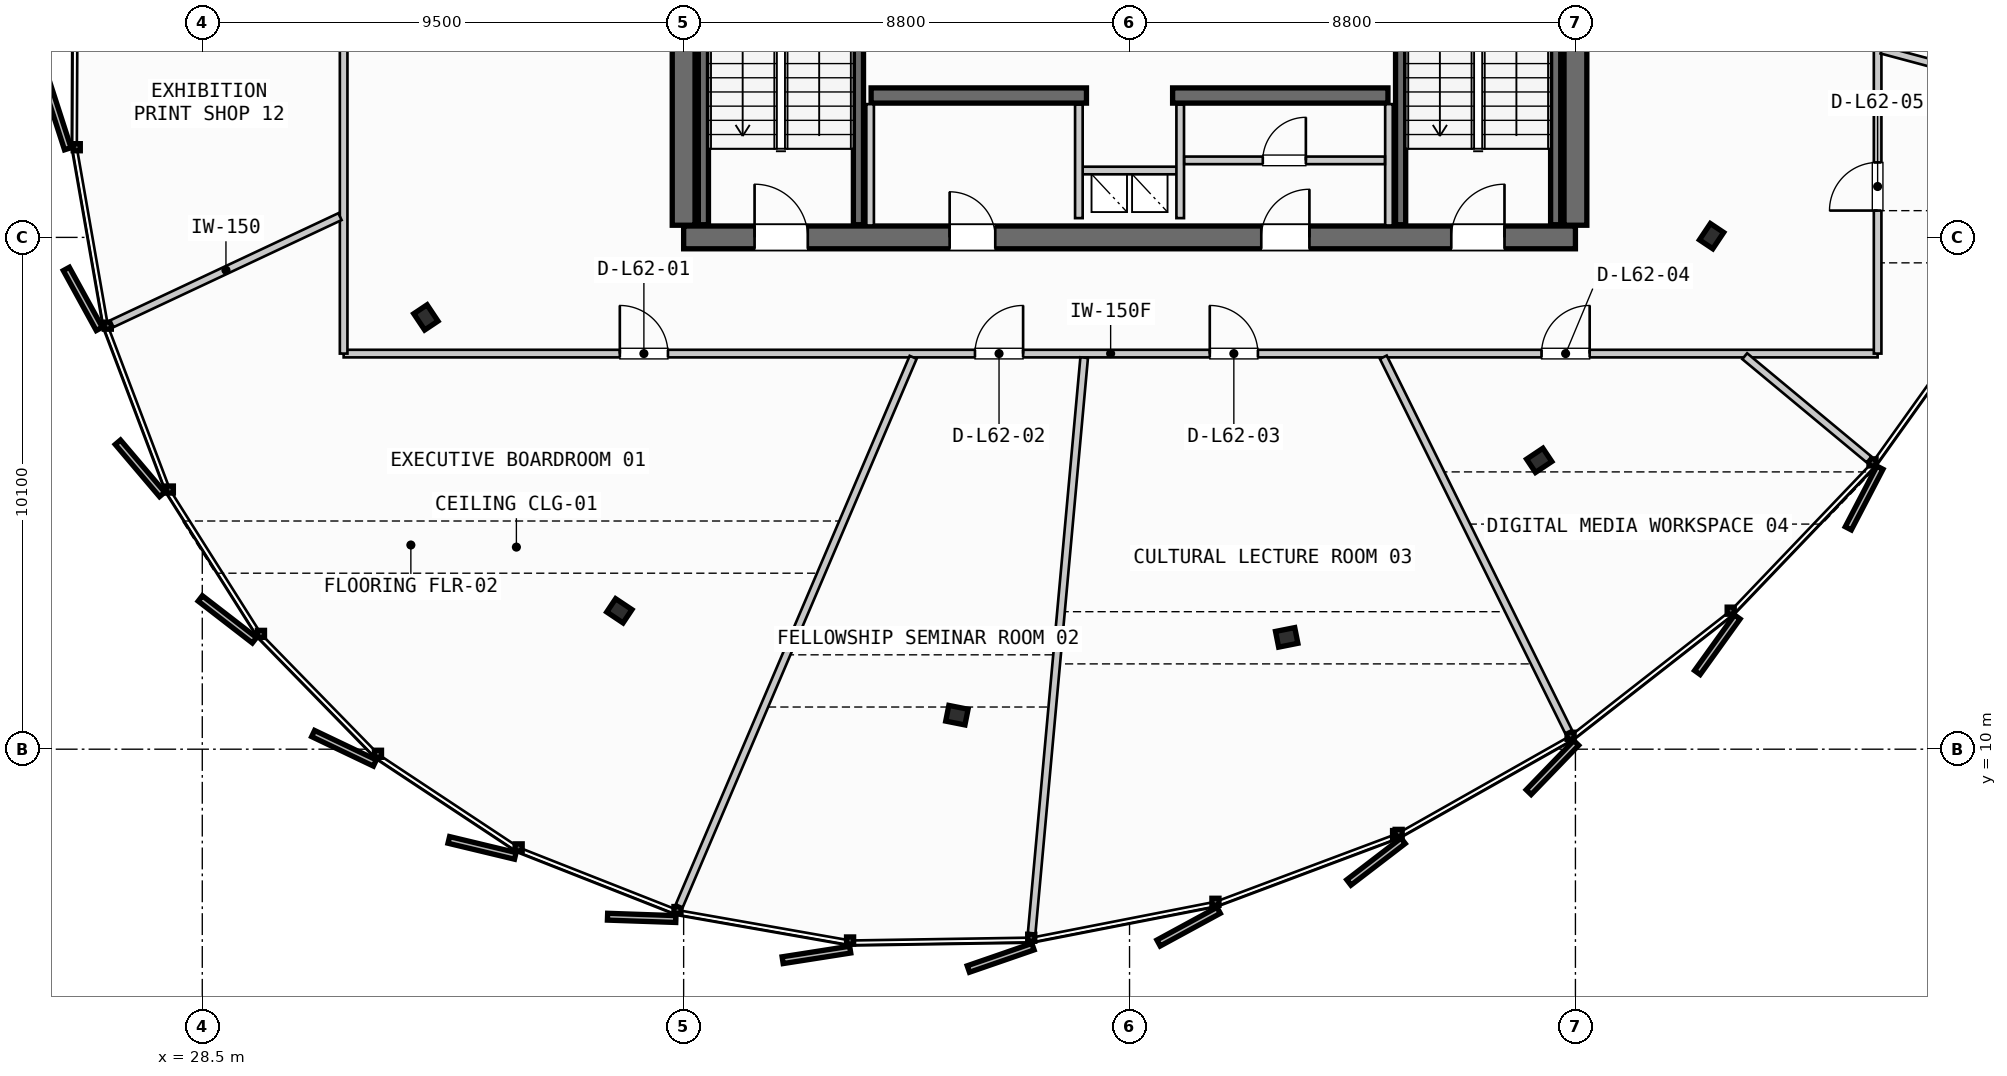
"""IFC4 building model, lengths in metres.
Left out: names, types, materials, properties, quantities, classifications, styles, units other than length and angle.
Written with IfcOpenShell. Run it as: python <this file> out.ifc"""

import sys

from ifc_helpers import new_model, si_unit, direction, frame, frame_2d, origin, origin_2d, place, context, subcontext, project, spatial, rectangle, i_section, extrude, source, transform, mapped, element, fill, save


model = new_model("IFC4")
c1 = context("Model", 3, precision=1e-05, world=origin(), true_north=direction((0.0, 1.0)))
c2 = subcontext(c1, "Body", "Model", "MODEL_VIEW")
j1 = project(units=[si_unit("LENGTHUNIT", "METRE"), si_unit("PLANEANGLEUNIT", "RADIAN")], contexts=[c1])
p1 = place(None, origin())
s1 = spatial("IfcSite", under=j1, at=p1, CompositionType="ELEMENT")
p2 = place(p1, origin())
s2 = spatial("IfcBuilding", under=s1, at=p2, CompositionType="ELEMENT")
p3 = place(p2, frame((0.0, 0.0, 238.75)))
s3 = spatial("IfcBuildingStorey", under=s2, at=p3, CompositionType="ELEMENT", Elevation=238.75)
p4 = place(p3, frame((38.0, 20.1, 0.0), z_axis=(0.0, 0.0, 1.0), x_axis=(1.0, 0.0, 0.0)))
e1 = element("IfcWall", 1, at=p4, inside=s3, PredefinedType="SHEAR", context=c2, shape_type="SweptSolid", body=[
    extrude(rectangle(XDim=17.6, YDim=0.45, at=frame_2d((8.8, 0.0))), origin(), (0.0, 0.0, 1.0), 3.21),
])
p5 = place(p4, frame((1.4, 0.0, 0.0)))
e2 = element("IfcOpeningElement", 2, at=p5, cuts=e1, PredefinedType="OPENING", context=c2, shape_type="SweptSolid", body=[
    extrude(rectangle(XDim=1.05, YDim=2.15, at=frame_2d((0.525, 1.075))), frame((0.0, 0.235, 0.0), z_axis=(0.0, -1.0, 0.0), x_axis=(1.0, 0.0, 0.0)), (0.0, 0.0, 1.0), 0.47),
])
p6 = place(p4, frame((15.15, 0.0, 0.0)))
e3 = element("IfcOpeningElement", 3, at=p6, cuts=e1, PredefinedType="OPENING", context=c2, shape_type="SweptSolid", body=[
    extrude(rectangle(XDim=1.05, YDim=2.15, at=frame_2d((0.525, 1.075))), frame((0.0, 0.235, 0.0), z_axis=(0.0, -1.0, 0.0), x_axis=(1.0, 0.0, 0.0)), (0.0, 0.0, 1.0), 0.47),
])
p7 = place(p4, frame((5.25, 0.0, 0.0)))
e4 = element("IfcOpeningElement", 4, at=p7, cuts=e1, PredefinedType="OPENING", context=c2, shape_type="SweptSolid", body=[
    extrude(rectangle(XDim=0.9, YDim=2.15, at=frame_2d((0.45, 1.075))), frame((0.0, 0.235, 0.0), z_axis=(0.0, -1.0, 0.0), x_axis=(1.0, 0.0, 0.0)), (0.0, 0.0, 1.0), 0.47),
])
p8 = place(p4, frame((11.4, 0.0, 0.0)))
e5 = element("IfcOpeningElement", 5, at=p8, cuts=e1, PredefinedType="OPENING", context=c2, shape_type="SweptSolid", body=[
    extrude(rectangle(XDim=0.95, YDim=2.15, at=frame_2d((0.475, 1.075))), frame((0.0, 0.235, 0.0), z_axis=(0.0, -1.0, 0.0), x_axis=(1.0, 0.0, 0.0)), (0.0, 0.0, 1.0), 0.47),
])
p9 = place(p3, frame((38.0, 35.26, 0.0), z_axis=(0.0, 0.0, 1.0), x_axis=(0.0, -1.0, 0.0)))
e6 = element("IfcWall", 6, at=p9, inside=s3, PredefinedType="SHEAR", context=c2, shape_type="SweptSolid", body=[
    extrude(rectangle(XDim=14.92, YDim=0.45, at=frame_2d((7.46, 0.0))), origin(), (0.0, 0.0, 1.0), 3.21),
])
p10 = place(p9, frame((5.21, 0.0, 0.0)))
e7 = element("IfcOpeningElement", 7, at=p10, cuts=e6, PredefinedType="OPENING", context=c2, shape_type="SweptSolid", body=[
    extrude(rectangle(XDim=1.1, YDim=2.2, at=frame_2d((0.55, 1.1))), frame((0.0, 0.235, 0.0), z_axis=(0.0, -1.0, 0.0), x_axis=(1.0, 0.0, 0.0)), (0.0, 0.0, 1.0), 0.47),
])
p11 = place(p3, frame((55.6, 20.34, 0.0), z_axis=(0.0, 0.0, 1.0), x_axis=(0.0, 1.0, 0.0)))
e8 = element("IfcWall", 8, at=p11, inside=s3, PredefinedType="SHEAR", context=c2, shape_type="SweptSolid", body=[
    extrude(rectangle(XDim=14.92, YDim=0.45, at=frame_2d((7.46, 0.0))), origin(), (0.0, 0.0, 1.0), 3.21),
])
p12 = place(p11, frame((12.71, 0.0, 0.0)))
e9 = element("IfcOpeningElement", 9, at=p12, cuts=e8, PredefinedType="OPENING", context=c2, shape_type="SweptSolid", body=[
    extrude(rectangle(XDim=1.05, YDim=2.15, at=frame_2d((0.525, 1.075))), frame((0.0, 0.235, 0.0), z_axis=(0.0, -1.0, 0.0), x_axis=(1.0, 0.0, 0.0)), (0.0, 0.0, 1.0), 0.47),
])
p13 = place(p11, frame((8.61, 0.0, 0.0)))
e10 = element("IfcOpeningElement", 10, at=p13, cuts=e8, PredefinedType="OPENING", context=c2, shape_type="SweptSolid", body=[
    extrude(rectangle(XDim=1.1, YDim=2.2, at=frame_2d((0.55, 1.1))), frame((0.0, 0.235, 0.0), z_axis=(0.0, -1.0, 0.0), x_axis=(1.0, 0.0, 0.0)), (0.0, 0.0, 1.0), 0.47),
])
for number, where, z_axis, x_axis in (
    (11, (41.7, 22.9, 0.0), (0.0, 0.0, 1.0), (1.0, 0.0, 0.0)),
    (12, (47.65, 22.9, 0.0), (0.0, 0.0, 1.0), (1.0, 0.0, 0.0)),
):
    element("IfcWall", number, at=place(p3, frame(where, z_axis=z_axis, x_axis=x_axis)), inside=s3, PredefinedType="SHEAR", context=c2, shape_type="SweptSolid", body=[
        extrude(rectangle(XDim=4.25, YDim=0.3, at=frame_2d((2.125, 0.0))), origin(), (0.0, 0.0, 1.0), 3.21),
    ])
m1 = source(origin(), c2, "Body", "SweptSolid", [
    extrude(i_section(OverallWidth=0.387, OverallDepth=0.316, WebThickness=0.019, FlangeThickness=0.028, FilletRadius=0.015, at=origin_2d()), origin(), (0.0, 0.0, 1.0), 3.21),
])
for number, where, z_axis, x_axis in (
    (13, (32.913, 18.521, 0.0), (0.0, 0.0, 1.0), (-0.831, -0.556, 0.0)),
    (14, (36.731, 12.731, 0.0), (0.0, 0.0, 1.0), (-0.556, -0.831, 0.0)),
    (15, (43.393, 10.671, 0.0), (0.0, 0.0, 1.0), (-0.195, -0.981, 0.0)),
    (16, (49.902, 12.207, 0.0), (0.0, 0.0, 1.0), (0.195, -0.981, 0.0)),
    (17, (54.885, 15.7, 0.0), (0.0, 0.0, 1.0), (0.556, -0.831, 0.0)),
    (18, (58.287, 20.125, 0.0), (0.0, 0.0, 1.0), (0.831, -0.556, 0.0)),
):
    element("IfcColumn", number, at=place(p3, frame(where, z_axis=z_axis, x_axis=x_axis)), inside=s3, PredefinedType="COLUMN", context=c2, shape_type="MappedRepresentation", body=[
        mapped(m1, transform((0.0, 0.0, 0.0), scale=1.0)),
    ])
for number, where, z_axis, x_axis in (
    (19, (41.45, 27.7, 0.0), (0.0, 0.0, 1.0), (0.0, -1.0, 0.0)),
    (20, (38.39, 20.35, 0.0), (0.0, 0.0, 1.0), (0.0, 1.0, 0.0)),
    (21, (55.21, 27.7, 0.0), (0.0, 0.0, 1.0), (0.0, -1.0, 0.0)),
    (22, (52.15, 20.35, 0.0), (0.0, 0.0, 1.0), (0.0, 1.0, 0.0)),
):
    element("IfcWall", number, at=place(p3, frame(where, z_axis=z_axis, x_axis=x_axis)), inside=s3, PredefinedType="SHEAR", context=c2, shape_type="SweptSolid", body=[
        extrude(rectangle(XDim=7.35, YDim=0.2, at=frame_2d((3.675, 0.0))), origin(), (0.0, 0.0, 1.0), 3.21),
    ])
p14 = place(p3, frame((45.8, 21.42, 0.0), z_axis=(0.0, 0.0, 1.0), x_axis=(1.0, 0.0, 0.0)))
e23 = element("IfcWall", 23, at=p14, inside=s3, PredefinedType="PARTITIONING", context=c2, shape_type="SweptSolid", body=[
    extrude(rectangle(XDim=2.0, YDim=0.15, at=frame_2d((1.0, 0.0))), origin(), (0.0, 0.0, 1.0), 2.28),
])
for number, where, z_axis, x_axis in (
    (24, (45.8, 20.48, 0.0), (0.0, 0.0, 1.0), (0.0, 1.0, 0.0)),
    (25, (47.8, 20.48, 0.0), (0.0, 0.0, 1.0), (0.0, 1.0, 0.0)),
):
    element("IfcWall", number, at=place(p3, frame(where, z_axis=z_axis, x_axis=x_axis)), inside=s3, PredefinedType="PARTITIONING", context=c2, shape_type="SweptSolid", body=[
        extrude(rectangle(XDim=2.24, YDim=0.15, at=frame_2d((1.12, 0.0))), origin(), (0.0, 0.0, 1.0), 2.28),
    ])
for number, where, z_axis, x_axis in (
    (26, (41.68, 20.335, 0.0), (0.0, 0.0, 1.0), (0.0, 1.0, 0.0)),
    (27, (51.92, 20.335, 0.0), (0.0, 0.0, 1.0), (0.0, 1.0, 0.0)),
):
    element("IfcWall", number, at=place(p3, frame(where, z_axis=z_axis, x_axis=x_axis)), inside=s3, PredefinedType="PARTITIONING", context=c2, shape_type="SweptSolid", body=[
        extrude(rectangle(XDim=2.395, YDim=0.15, at=frame_2d((1.198, 0.0))), origin(), (0.0, 0.0, 1.0), 2.28),
    ])
p15 = place(p3, frame((47.88, 21.62, 0.0), z_axis=(0.0, 0.0, 1.0), x_axis=(1.0, 0.0, 0.0)))
e28 = element("IfcWall", 28, at=p15, inside=s3, PredefinedType="PARTITIONING", context=c2, shape_type="SweptSolid", body=[
    extrude(rectangle(XDim=3.96, YDim=0.15, at=frame_2d((1.98, 0.0))), origin(), (0.0, 0.0, 1.0), 2.28),
])
p16 = place(p15, frame((1.55, 0.0, 0.0)))
e29 = element("IfcOpeningElement", 29, at=p16, cuts=e28, PredefinedType="OPENING", context=c2, shape_type="SweptSolid", body=[
    extrude(rectangle(XDim=0.85, YDim=2.15, at=frame_2d((0.425, 1.075))), frame((0.0, 0.085, 0.0), z_axis=(0.0, -1.0, 0.0), x_axis=(1.0, 0.0, 0.0)), (0.0, 0.0, 1.0), 0.17),
])
p17 = place(p3, frame((31.29, 17.807, 0.0), z_axis=(0.0, 0.0, 1.0), x_axis=(1.0, 0.0, 0.0)))
e30 = element("IfcWall", 30, at=p17, inside=s3, PredefinedType="PARTITIONING", context=c2, shape_type="SweptSolid", body=[
    extrude(rectangle(XDim=30.274, YDim=0.15, at=frame_2d((15.137, 0.0))), origin(), (0.0, 0.0, 1.0), 2.28),
])
p18 = place(p17, frame((5.45, 0.0, 0.0)))
e31 = element("IfcOpeningElement", 31, at=p18, cuts=e30, PredefinedType="OPENING", context=c2, shape_type="SweptSolid", body=[
    extrude(rectangle(XDim=0.95, YDim=2.15, at=frame_2d((0.475, 1.075))), frame((0.0, 0.085, 0.0), z_axis=(0.0, -1.0, 0.0), x_axis=(1.0, 0.0, 0.0)), (0.0, 0.0, 1.0), 0.17),
])
p19 = place(p17, frame((12.459, 0.0, 0.0)))
e32 = element("IfcOpeningElement", 32, at=p19, cuts=e30, PredefinedType="OPENING", context=c2, shape_type="SweptSolid", body=[
    extrude(rectangle(XDim=0.95, YDim=2.15, at=frame_2d((0.475, 1.075))), frame((0.0, 0.085, 0.0), z_axis=(0.0, -1.0, 0.0), x_axis=(1.0, 0.0, 0.0)), (0.0, 0.0, 1.0), 0.17),
])
p20 = place(p17, frame((17.094, 0.0, 0.0)))
e33 = element("IfcOpeningElement", 33, at=p20, cuts=e30, PredefinedType="OPENING", context=c2, shape_type="SweptSolid", body=[
    extrude(rectangle(XDim=0.95, YDim=2.15, at=frame_2d((0.475, 1.075))), frame((0.0, 0.085, 0.0), z_axis=(0.0, -1.0, 0.0), x_axis=(1.0, 0.0, 0.0)), (0.0, 0.0, 1.0), 0.17),
])
p21 = place(p17, frame((23.641, 0.0, 0.0)))
e34 = element("IfcOpeningElement", 34, at=p21, cuts=e30, PredefinedType="OPENING", context=c2, shape_type="SweptSolid", body=[
    extrude(rectangle(XDim=0.95, YDim=2.15, at=frame_2d((0.475, 1.075))), frame((0.0, 0.085, 0.0), z_axis=(0.0, -1.0, 0.0), x_axis=(1.0, 0.0, 0.0)), (0.0, 0.0, 1.0), 0.17),
])
p22 = place(p3, frame((61.564, 17.807, 0.0), z_axis=(0.0, 0.0, 1.0), x_axis=(0.0, 1.0, 0.0)))
e35 = element("IfcWall", 35, at=p22, inside=s3, PredefinedType="PARTITIONING", context=c2, shape_type="SweptSolid", body=[
    extrude(rectangle(XDim=19.986, YDim=0.15, at=frame_2d((9.993, 0.0))), origin(), (0.0, 0.0, 1.0), 2.28),
])
p23 = place(p22, frame((2.823, 0.0, 0.0)))
e36 = element("IfcOpeningElement", 36, at=p23, cuts=e35, PredefinedType="OPENING", context=c2, shape_type="SweptSolid", body=[
    extrude(rectangle(XDim=0.95, YDim=2.15, at=frame_2d((0.475, 1.075))), frame((0.0, 0.085, 0.0), z_axis=(0.0, -1.0, 0.0), x_axis=(1.0, 0.0, 0.0)), (0.0, 0.0, 1.0), 0.17),
])
p24 = place(p22, frame((9.957, 0.0, 0.0)))
e37 = element("IfcOpeningElement", 37, at=p24, cuts=e35, PredefinedType="OPENING", context=c2, shape_type="SweptSolid", body=[
    extrude(rectangle(XDim=0.95, YDim=2.15, at=frame_2d((0.475, 1.075))), frame((0.0, 0.085, 0.0), z_axis=(0.0, -1.0, 0.0), x_axis=(1.0, 0.0, 0.0)), (0.0, 0.0, 1.0), 0.17),
])
p25 = place(p22, frame((15.774, 0.0, 0.0)))
e38 = element("IfcOpeningElement", 38, at=p25, cuts=e35, PredefinedType="OPENING", context=c2, shape_type="SweptSolid", body=[
    extrude(rectangle(XDim=0.95, YDim=2.15, at=frame_2d((0.475, 1.075))), frame((0.0, 0.085, 0.0), z_axis=(0.0, -1.0, 0.0), x_axis=(1.0, 0.0, 0.0)), (0.0, 0.0, 1.0), 0.17),
])
p26 = place(p3, frame((31.29, 37.793, 0.0), z_axis=(0.0, 0.0, 1.0), x_axis=(0.0, -1.0, 0.0)))
e39 = element("IfcWall", 39, at=p26, inside=s3, PredefinedType="PARTITIONING", context=c2, shape_type="SweptSolid", body=[
    extrude(rectangle(XDim=19.986, YDim=0.15, at=frame_2d((9.993, 0.0))), origin(), (0.0, 0.0, 1.0), 2.28),
])
p27 = place(p26, frame((3.296, 0.0, 0.0)))
e40 = element("IfcOpeningElement", 40, at=p27, cuts=e39, PredefinedType="OPENING", context=c2, shape_type="SweptSolid", body=[
    extrude(rectangle(XDim=0.95, YDim=2.15, at=frame_2d((0.475, 1.075))), frame((0.0, 0.085, 0.0), z_axis=(0.0, -1.0, 0.0), x_axis=(1.0, 0.0, 0.0)), (0.0, 0.0, 1.0), 0.17),
])
p28 = place(p26, frame((10.581, 0.0, 0.0)))
e41 = element("IfcOpeningElement", 41, at=p28, cuts=e39, PredefinedType="OPENING", context=c2, shape_type="SweptSolid", body=[
    extrude(rectangle(XDim=0.95, YDim=2.15, at=frame_2d((0.475, 1.075))), frame((0.0, 0.085, 0.0), z_axis=(0.0, -1.0, 0.0), x_axis=(1.0, 0.0, 0.0)), (0.0, 0.0, 1.0), 0.17),
])
p29 = place(p3, frame((31.218, 20.51, 0.0), z_axis=(0.0, 0.0, 1.0), x_axis=(-0.905164470227, -0.425061503594, 0.0)))
e42 = element("IfcWall", 42, at=p29, inside=s3, PredefinedType="PARTITIONING", context=c2, shape_type="SweptSolid", body=[
    extrude(rectangle(XDim=4.972, YDim=0.15, at=frame_2d((2.486, 0.0))), origin(), (0.0, 0.0, 1.0), 2.28),
])
p30 = place(p3, frame((42.53, 17.733, 0.0), z_axis=(0.0, 0.0, 1.0), x_axis=(-0.392256151755, -0.919856027545, 0.0)))
e43 = element("IfcWall", 43, at=p30, inside=s3, PredefinedType="PARTITIONING", context=c2, shape_type="SweptSolid", body=[
    extrude(rectangle(XDim=11.768, YDim=0.15, at=frame_2d((5.884, 0.0))), origin(), (0.0, 0.0, 1.0), 2.28),
])
p31 = place(p3, frame((45.905, 17.727, 0.0), z_axis=(0.0, 0.0, 1.0), x_axis=(-0.090867706683, -0.995862972443, 0.0)))
e44 = element("IfcWall", 44, at=p31, inside=s3, PredefinedType="PARTITIONING", context=c2, shape_type="SweptSolid", body=[
    extrude(rectangle(XDim=11.405, YDim=0.15, at=frame_2d((5.703, 0.0))), origin(), (0.0, 0.0, 1.0), 2.28),
])
p32 = place(p3, frame((51.809, 17.735, 0.0), z_axis=(0.0, 0.0, 1.0), x_axis=(0.443430935713, -0.896308543557, 0.0)))
e45 = element("IfcWall", 45, at=p32, inside=s3, PredefinedType="PARTITIONING", context=c2, shape_type="SweptSolid", body=[
    extrude(rectangle(XDim=8.244, YDim=0.15, at=frame_2d((4.122, 0.0))), origin(), (0.0, 0.0, 1.0), 2.28),
])
p33 = place(p3, frame((58.941, 17.756, 0.0), z_axis=(0.0, 0.0, 1.0), x_axis=(0.769180531138, -0.639031541098, 0.0)))
e46 = element("IfcWall", 46, at=p33, inside=s3, PredefinedType="PARTITIONING", context=c2, shape_type="SweptSolid", body=[
    extrude(rectangle(XDim=3.189, YDim=0.15, at=frame_2d((1.594, 0.0))), origin(), (0.0, 0.0, 1.0), 2.28),
])
p34 = place(p3, frame((61.641, 23.802, 0.0), z_axis=(0.0, 0.0, 1.0), x_axis=(0.966112425525, -0.258121640407, 0.0)))
e47 = element("IfcWall", 47, at=p34, inside=s3, PredefinedType="PARTITIONING", context=c2, shape_type="SweptSolid", body=[
    extrude(rectangle(XDim=4.204, YDim=0.15, at=frame_2d((2.102, 0.0))), origin(), (0.0, 0.0, 1.0), 2.28),
])
m2 = source(origin(), c2, "Body", "SweptSolid", [
    extrude(rectangle(XDim=1.05, YDim=2.15, at=frame_2d((0.525, 1.075))), frame((0.0, 0.025, 0.0), z_axis=(0.0, -1.0, 0.0), x_axis=(1.0, 0.0, 0.0)), (0.0, 0.0, 1.0), 0.05),
])
p35 = place(p5, origin())
e48 = element("IfcDoor", 48, at=p35, inside=s3, OperationType="SINGLE_SWING_LEFT", PredefinedType="DOOR", context=c2, shape_type="MappedRepresentation", body=[
    mapped(m2, transform((0.0, 0.0, 0.0), scale=1.0)),
])
fill(e2, e48)
p36 = place(p6, origin())
e49 = element("IfcDoor", 49, at=p36, inside=s3, OperationType="SINGLE_SWING_RIGHT", PredefinedType="DOOR", context=c2, shape_type="MappedRepresentation", body=[
    mapped(m2, transform((0.0, 0.0, 0.0), scale=1.0)),
])
fill(e3, e49)
m3 = source(origin(), c2, "Body", "SweptSolid", [
    extrude(rectangle(XDim=0.9, YDim=2.15, at=frame_2d((0.45, 1.075))), frame((0.0, 0.025, 0.0), z_axis=(0.0, -1.0, 0.0), x_axis=(1.0, 0.0, 0.0)), (0.0, 0.0, 1.0), 0.05),
])
p37 = place(p7, origin())
e50 = element("IfcDoor", 50, at=p37, inside=s3, OperationType="SINGLE_SWING_LEFT", PredefinedType="DOOR", context=c2, shape_type="MappedRepresentation", body=[
    mapped(m3, transform((0.0, 0.0, 0.0), scale=1.0)),
])
fill(e4, e50)
m4 = source(origin(), c2, "Body", "SweptSolid", [
    extrude(rectangle(XDim=0.95, YDim=2.15, at=frame_2d((0.475, 1.075))), frame((0.0, 0.025, 0.0), z_axis=(0.0, -1.0, 0.0), x_axis=(1.0, 0.0, 0.0)), (0.0, 0.0, 1.0), 0.05),
])
p38 = place(p8, origin())
e51 = element("IfcDoor", 51, at=p38, inside=s3, OperationType="SINGLE_SWING_RIGHT", PredefinedType="DOOR", context=c2, shape_type="MappedRepresentation", body=[
    mapped(m4, transform((0.0, 0.0, 0.0), scale=1.0)),
])
fill(e5, e51)
m5 = source(origin(), c2, "Body", "SweptSolid", [
    extrude(rectangle(XDim=0.85, YDim=2.15, at=frame_2d((0.425, 1.075))), frame((0.0, 0.025, 0.0), z_axis=(0.0, -1.0, 0.0), x_axis=(1.0, 0.0, 0.0)), (0.0, 0.0, 1.0), 0.05),
])
p39 = place(p16, origin())
e52 = element("IfcDoor", 52, at=p39, inside=s3, OperationType="SINGLE_SWING_RIGHT", PredefinedType="DOOR", context=c2, shape_type="MappedRepresentation", body=[
    mapped(m5, transform((0.0, 0.0, 0.0), scale=1.0)),
])
fill(e29, e52)
p40 = place(p18, origin())
e53 = element("IfcDoor", 53, at=p40, inside=s3, OperationType="SINGLE_SWING_LEFT", PredefinedType="DOOR", context=c2, shape_type="MappedRepresentation", body=[
    mapped(m4, transform((0.0, 0.0, 0.0), scale=1.0)),
])
fill(e31, e53)
p41 = place(p19, origin())
e54 = element("IfcDoor", 54, at=p41, inside=s3, OperationType="SINGLE_SWING_RIGHT", PredefinedType="DOOR", context=c2, shape_type="MappedRepresentation", body=[
    mapped(m4, transform((0.0, 0.0, 0.0), scale=1.0)),
])
fill(e32, e54)
p42 = place(p20, origin())
e55 = element("IfcDoor", 55, at=p42, inside=s3, OperationType="SINGLE_SWING_LEFT", PredefinedType="DOOR", context=c2, shape_type="MappedRepresentation", body=[
    mapped(m4, transform((0.0, 0.0, 0.0), scale=1.0)),
])
fill(e33, e55)
p43 = place(p21, origin())
e56 = element("IfcDoor", 56, at=p43, inside=s3, OperationType="SINGLE_SWING_RIGHT", PredefinedType="DOOR", context=c2, shape_type="MappedRepresentation", body=[
    mapped(m4, transform((0.0, 0.0, 0.0), scale=1.0)),
])
fill(e34, e56)
p44 = place(p23, origin())
e57 = element("IfcDoor", 57, at=p44, inside=s3, OperationType="SINGLE_SWING_LEFT", PredefinedType="DOOR", context=c2, shape_type="MappedRepresentation", body=[
    mapped(m4, transform((0.0, 0.0, 0.0), scale=1.0)),
])
fill(e36, e57)
save(model, sys.argv[1])
